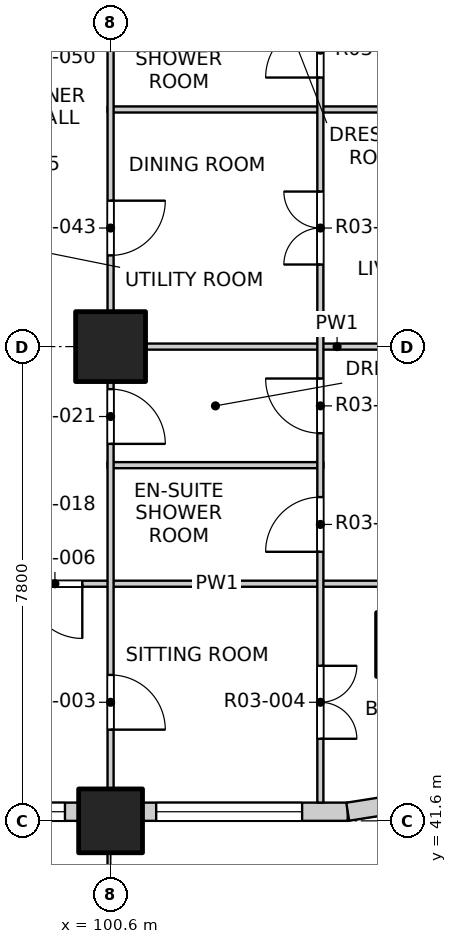
"""IFC4 building model, lengths in metres.
Left out: names, types, materials, properties, quantities, classifications, styles, units other than length and angle.
Written with IfcOpenShell. Run it as: python <this file> out.ifc"""

import sys

from ifc_helpers import new_model, si_unit, direction, frame, frame_2d, origin, origin_2d, place, context, subcontext, project, spatial, rectangle, extrude, element, fill, save


model = new_model("IFC4")
c1 = context("Model", 3, precision=1e-05, world=origin(), true_north=direction((0.0, 1.0)))
c2 = subcontext(c1, "Body", "Model", "MODEL_VIEW")
j1 = project(units=[si_unit("LENGTHUNIT", "METRE"), si_unit("PLANEANGLEUNIT", "RADIAN")], contexts=[c1])
p1 = place(None, origin())
s1 = spatial("IfcSite", under=j1, at=p1, CompositionType="ELEMENT")
p2 = place(p1, origin())
s2 = spatial("IfcBuilding", under=s1, at=p2, CompositionType="ELEMENT")
p3 = place(p2, frame((0.0, 0.0, 39.9)))
s3 = spatial("IfcBuildingStorey", under=s2, at=p3, CompositionType="ELEMENT", Elevation=39.9)
for number, where, z_axis, x_axis in (
    (1, (105.5, 44.5, -0.25), (0.0, 0.0, 1.0), (1.0, 0.0, 0.0)),
    (2, (100.6, 41.6, -0.25), (0.0, 0.0, 1.0), (1.0, 0.0, 0.0)),
):
    element("IfcColumn", number, at=place(p3, frame(where, z_axis=z_axis, x_axis=x_axis)), inside=s3, PredefinedType="COLUMN", context=c2, shape_type="SweptSolid", body=[
        extrude(rectangle(XDim=1.05, YDim=1.05, at=origin_2d()), origin(), (0.0, 0.0, 1.0), 3.4),
    ])
p4 = place(p3, frame((100.6, 49.4, -0.25), z_axis=(0.0, 0.0, 1.0), x_axis=(1.0, 0.0, 0.0)))
e3 = element("IfcColumn", 3, at=p4, inside=s3, PredefinedType="COLUMN", context=c2, shape_type="SweptSolid", body=[
    extrude(rectangle(XDim=1.15, YDim=1.15, at=origin_2d()), origin(), (0.0, 0.0, 1.0), 3.4),
])
p5 = place(p3, frame((93.325, 41.75, 0.0), z_axis=(0.0, 0.0, 1.0), x_axis=(1.0, 0.0, 0.0)))
e4 = element("IfcWall", 4, at=p5, inside=s3, PredefinedType="SOLIDWALL", context=c2, shape_type="SweptSolid", body=[
    extrude(rectangle(XDim=6.75, YDim=0.3, at=frame_2d((3.375, 0.0))), origin(), (0.0, 0.0, 1.0), 2.7),
])
p6 = place(p5, frame((0.525, 0.0, 0.0)))
e5 = element("IfcOpeningElement", 5, at=p6, cuts=e4, PredefinedType="OPENING", context=c2, shape_type="SweptSolid", body=[
    extrude(rectangle(XDim=1.8, YDim=2.4, at=frame_2d((0.9, 1.2))), frame((0.0, 0.16, 0.0), z_axis=(0.0, -1.0, 0.0), x_axis=(1.0, 0.0, 0.0)), (0.0, 0.0, 1.0), 0.32),
])
p7 = place(p5, frame((4.125, 0.0, 0.9)))
e6 = element("IfcOpeningElement", 6, at=p7, cuts=e4, PredefinedType="OPENING", context=c2, shape_type="SweptSolid", body=[
    extrude(rectangle(XDim=2.4, YDim=1.8, at=frame_2d((1.2, 0.9))), frame((0.0, 0.16, 0.0), z_axis=(0.0, -1.0, 0.0), x_axis=(1.0, 0.0, 0.0)), (0.0, 0.0, 1.0), 0.32),
])
p8 = place(p3, frame((101.125, 41.75, 0.0), z_axis=(0.0, 0.0, 1.0), x_axis=(1.0, 0.0, 0.0)))
e7 = element("IfcWall", 7, at=p8, inside=s3, PredefinedType="SOLIDWALL", context=c2, shape_type="SweptSolid", body=[
    extrude(rectangle(XDim=3.375, YDim=0.3, at=frame_2d((1.688, 0.0))), origin(), (0.0, 0.0, 1.0), 2.7),
])
p9 = place(p8, frame((0.225, 0.0, 0.9)))
e8 = element("IfcOpeningElement", 8, at=p9, cuts=e7, PredefinedType="OPENING", context=c2, shape_type="SweptSolid", body=[
    extrude(rectangle(XDim=2.4, YDim=1.8, at=frame_2d((1.2, 0.9))), frame((0.0, 0.16, 0.0), z_axis=(0.0, -1.0, 0.0), x_axis=(1.0, 0.0, 0.0)), (0.0, 0.0, 1.0), 0.32),
])
p10 = place(p3, frame((104.5, 41.75, 0.0), z_axis=(0.0, 0.0, 1.0), x_axis=(0.987678452879, 0.156496880861, 0.0)))
e9 = element("IfcWall", 9, at=p10, inside=s3, PredefinedType="SOLIDWALL", context=c2, shape_type="SweptSolid", body=[
    extrude(rectangle(XDim=1.173, YDim=0.3, at=frame_2d((0.586, 0.0))), origin(), (0.0, 0.0, 1.0), 2.7),
])
p11 = place(p3, frame((96.6, 45.5, 0.0), z_axis=(0.0, 0.0, 1.0), x_axis=(1.0, 0.0, 0.0)))
e10 = element("IfcWall", 10, at=p11, inside=s3, PredefinedType="PARTITIONING", context=c2, shape_type="SweptSolid", body=[
    extrude(rectangle(XDim=11.5, YDim=0.1, at=frame_2d((5.75, 0.0))), origin(), (0.0, 0.0, 1.0), 3.15),
])
p12 = place(p11, frame((2.635, 0.0, 0.0)))
e11 = element("IfcOpeningElement", 11, at=p12, cuts=e10, PredefinedType="OPENING", context=c2, shape_type="SweptSolid", body=[
    extrude(rectangle(XDim=0.9, YDim=2.1, at=frame_2d((0.45, 1.05))), frame((0.0, 0.06, 0.0), z_axis=(0.0, -1.0, 0.0), x_axis=(1.0, 0.0, 0.0)), (0.0, 0.0, 1.0), 0.12),
])
p13 = place(p3, frame((100.55, 47.45, 0.0), z_axis=(0.0, 0.0, 1.0), x_axis=(1.0, 0.0, 0.0)))
e12 = element("IfcWall", 12, at=p13, inside=s3, PredefinedType="PARTITIONING", context=c2, shape_type="SweptSolid", body=[
    extrude(rectangle(XDim=3.55, YDim=0.1, at=frame_2d((1.775, 0.0))), origin(), (0.0, 0.0, 1.0), 3.15),
])
for number, where, z_axis, x_axis in (
    (13, (100.55, 49.4, 0.0), (0.0, 0.0, 1.0), (1.0, 0.0, 0.0)),
    (14, (100.55, 53.3, 0.0), (0.0, 0.0, 1.0), (1.0, 0.0, 0.0)),
):
    element("IfcWall", number, at=place(p3, frame(where, z_axis=z_axis, x_axis=x_axis)), inside=s3, PredefinedType="PARTITIONING", context=c2, shape_type="SweptSolid", body=[
        extrude(rectangle(XDim=7.55, YDim=0.1, at=frame_2d((3.775, 0.0))), origin(), (0.0, 0.0, 1.0), 3.15),
    ])
p14 = place(p3, frame((100.6, 41.9, 0.0), z_axis=(0.0, 0.0, 1.0), x_axis=(0.0, 1.0, 0.0)))
e15 = element("IfcWall", 15, at=p14, inside=s3, PredefinedType="PARTITIONING", context=c2, shape_type="SweptSolid", body=[
    extrude(rectangle(XDim=7.5, YDim=0.1, at=frame_2d((3.75, 0.0))), origin(), (0.0, 0.0, 1.0), 2.55),
])
p15 = place(p14, frame((1.2, 0.0, 0.0)))
e16 = element("IfcOpeningElement", 16, at=p15, cuts=e15, PredefinedType="OPENING", context=c2, shape_type="SweptSolid", body=[
    extrude(rectangle(XDim=0.9, YDim=2.1, at=frame_2d((0.45, 1.05))), frame((0.0, 0.06, 0.0), z_axis=(0.0, -1.0, 0.0), x_axis=(1.0, 0.0, 0.0)), (0.0, 0.0, 1.0), 0.12),
])
p16 = place(p14, frame((5.9, 0.0, 0.0)))
e17 = element("IfcOpeningElement", 17, at=p16, cuts=e15, PredefinedType="OPENING", context=c2, shape_type="SweptSolid", body=[
    extrude(rectangle(XDim=0.9, YDim=2.1, at=frame_2d((0.45, 1.05))), frame((0.0, 0.06, 0.0), z_axis=(0.0, -1.0, 0.0), x_axis=(1.0, 0.0, 0.0)), (0.0, 0.0, 1.0), 0.12),
])
p17 = place(p3, frame((100.6, 49.4, 0.0), z_axis=(0.0, 0.0, 1.0), x_axis=(0.0, 1.0, 0.0)))
e18 = element("IfcWall", 18, at=p17, inside=s3, PredefinedType="PARTITIONING", context=c2, shape_type="SweptSolid", body=[
    extrude(rectangle(XDim=31.2, YDim=0.1, at=frame_2d((15.6, 0.0))), origin(), (0.0, 0.0, 1.0), 3.15),
])
p18 = place(p17, frame((1.5, 0.0, 0.0)))
e19 = element("IfcOpeningElement", 19, at=p18, cuts=e18, PredefinedType="OPENING", context=c2, shape_type="SweptSolid", body=[
    extrude(rectangle(XDim=0.9, YDim=2.1, at=frame_2d((0.45, 1.05))), frame((0.0, 0.06, 0.0), z_axis=(0.0, -1.0, 0.0), x_axis=(1.0, 0.0, 0.0)), (0.0, 0.0, 1.0), 0.12),
])
p19 = place(p17, frame((6.225, 0.0, 0.0)))
e20 = element("IfcOpeningElement", 20, at=p19, cuts=e18, PredefinedType="OPENING", context=c2, shape_type="SweptSolid", body=[
    extrude(rectangle(XDim=0.9, YDim=2.1, at=frame_2d((0.45, 1.05))), frame((0.0, 0.06, 0.0), z_axis=(0.0, -1.0, 0.0), x_axis=(1.0, 0.0, 0.0)), (0.0, 0.0, 1.0), 0.12),
])
p20 = place(p17, frame((10.275, 0.0, 0.0)))
e21 = element("IfcOpeningElement", 21, at=p20, cuts=e18, PredefinedType="OPENING", context=c2, shape_type="SweptSolid", body=[
    extrude(rectangle(XDim=0.9, YDim=2.1, at=frame_2d((0.45, 1.05))), frame((0.0, 0.06, 0.0), z_axis=(0.0, -1.0, 0.0), x_axis=(1.0, 0.0, 0.0)), (0.0, 0.0, 1.0), 0.12),
])
p21 = place(p17, frame((14.0, 0.0, 0.0)))
e22 = element("IfcOpeningElement", 22, at=p21, cuts=e18, PredefinedType="OPENING", context=c2, shape_type="SweptSolid", body=[
    extrude(rectangle(XDim=0.9, YDim=2.1, at=frame_2d((0.45, 1.05))), frame((0.0, 0.06, 0.0), z_axis=(0.0, -1.0, 0.0), x_axis=(1.0, 0.0, 0.0)), (0.0, 0.0, 1.0), 0.12),
])
p22 = place(p17, frame((17.1, 0.0, 0.0)))
e23 = element("IfcOpeningElement", 23, at=p22, cuts=e18, PredefinedType="OPENING", context=c2, shape_type="SweptSolid", body=[
    extrude(rectangle(XDim=0.9, YDim=2.1, at=frame_2d((0.45, 1.05))), frame((0.0, 0.06, 0.0), z_axis=(0.0, -1.0, 0.0), x_axis=(1.0, 0.0, 0.0)), (0.0, 0.0, 1.0), 0.12),
])
p23 = place(p17, frame((21.0, 0.0, 0.0)))
e24 = element("IfcOpeningElement", 24, at=p23, cuts=e18, PredefinedType="OPENING", context=c2, shape_type="SweptSolid", body=[
    extrude(rectangle(XDim=0.9, YDim=2.1, at=frame_2d((0.45, 1.05))), frame((0.0, 0.06, 0.0), z_axis=(0.0, -1.0, 0.0), x_axis=(1.0, 0.0, 0.0)), (0.0, 0.0, 1.0), 0.12),
])
p24 = place(p17, frame((25.875, 0.0, 0.0)))
e25 = element("IfcOpeningElement", 25, at=p24, cuts=e18, PredefinedType="OPENING", context=c2, shape_type="SweptSolid", body=[
    extrude(rectangle(XDim=0.9, YDim=2.1, at=frame_2d((0.45, 1.05))), frame((0.0, 0.06, 0.0), z_axis=(0.0, -1.0, 0.0), x_axis=(1.0, 0.0, 0.0)), (0.0, 0.0, 1.0), 0.12),
])
p25 = place(p17, frame((29.6, 0.0, 0.0)))
e26 = element("IfcOpeningElement", 26, at=p25, cuts=e18, PredefinedType="OPENING", context=c2, shape_type="SweptSolid", body=[
    extrude(rectangle(XDim=0.9, YDim=2.1, at=frame_2d((0.45, 1.05))), frame((0.0, 0.06, 0.0), z_axis=(0.0, -1.0, 0.0), x_axis=(1.0, 0.0, 0.0)), (0.0, 0.0, 1.0), 0.12),
])
p26 = place(p3, frame((104.05, 41.9, 0.0), z_axis=(0.0, 0.0, 1.0), x_axis=(0.0, 1.0, 0.0)))
e27 = element("IfcWall", 27, at=p26, inside=s3, PredefinedType="PARTITIONING", context=c2, shape_type="SweptSolid", body=[
    extrude(rectangle(XDim=46.2, YDim=0.1, at=frame_2d((23.1, 0.0))), origin(), (0.0, 0.0, 1.0), 3.15),
])
p27 = place(p26, frame((1.05, 0.0, 0.0)))
e28 = element("IfcOpeningElement", 28, at=p27, cuts=e27, PredefinedType="OPENING", context=c2, shape_type="SweptSolid", body=[
    extrude(rectangle(XDim=1.2, YDim=2.1, at=frame_2d((0.6, 1.05))), frame((0.0, 0.06, 0.0), z_axis=(0.0, -1.0, 0.0), x_axis=(1.0, 0.0, 0.0)), (0.0, 0.0, 1.0), 0.12),
])
p28 = place(p26, frame((4.125, 0.0, 0.0)))
e29 = element("IfcOpeningElement", 29, at=p28, cuts=e27, PredefinedType="OPENING", context=c2, shape_type="SweptSolid", body=[
    extrude(rectangle(XDim=0.9, YDim=2.1, at=frame_2d((0.45, 1.05))), frame((0.0, 0.06, 0.0), z_axis=(0.0, -1.0, 0.0), x_axis=(1.0, 0.0, 0.0)), (0.0, 0.0, 1.0), 0.12),
])
p29 = place(p26, frame((6.075, 0.0, 0.0)))
e30 = element("IfcOpeningElement", 30, at=p29, cuts=e27, PredefinedType="OPENING", context=c2, shape_type="SweptSolid", body=[
    extrude(rectangle(XDim=0.9, YDim=2.1, at=frame_2d((0.45, 1.05))), frame((0.0, 0.06, 0.0), z_axis=(0.0, -1.0, 0.0), x_axis=(1.0, 0.0, 0.0)), (0.0, 0.0, 1.0), 0.12),
])
p30 = place(p26, frame((8.85, 0.0, 0.0)))
e31 = element("IfcOpeningElement", 31, at=p30, cuts=e27, PredefinedType="OPENING", context=c2, shape_type="SweptSolid", body=[
    extrude(rectangle(XDim=1.2, YDim=2.1, at=frame_2d((0.6, 1.05))), frame((0.0, 0.06, 0.0), z_axis=(0.0, -1.0, 0.0), x_axis=(1.0, 0.0, 0.0)), (0.0, 0.0, 1.0), 0.12),
])
p31 = place(p26, frame((11.925, 0.0, 0.0)))
e32 = element("IfcOpeningElement", 32, at=p31, cuts=e27, PredefinedType="OPENING", context=c2, shape_type="SweptSolid", body=[
    extrude(rectangle(XDim=0.9, YDim=2.1, at=frame_2d((0.45, 1.05))), frame((0.0, 0.06, 0.0), z_axis=(0.0, -1.0, 0.0), x_axis=(1.0, 0.0, 0.0)), (0.0, 0.0, 1.0), 0.12),
])
p32 = place(p26, frame((13.875, 0.0, 0.0)))
e33 = element("IfcOpeningElement", 33, at=p32, cuts=e27, PredefinedType="OPENING", context=c2, shape_type="SweptSolid", body=[
    extrude(rectangle(XDim=0.9, YDim=2.1, at=frame_2d((0.45, 1.05))), frame((0.0, 0.06, 0.0), z_axis=(0.0, -1.0, 0.0), x_axis=(1.0, 0.0, 0.0)), (0.0, 0.0, 1.0), 0.12),
])
p33 = place(p26, frame((15.825, 0.0, 0.0)))
e34 = element("IfcOpeningElement", 34, at=p33, cuts=e27, PredefinedType="OPENING", context=c2, shape_type="SweptSolid", body=[
    extrude(rectangle(XDim=0.9, YDim=2.1, at=frame_2d((0.45, 1.05))), frame((0.0, 0.06, 0.0), z_axis=(0.0, -1.0, 0.0), x_axis=(1.0, 0.0, 0.0)), (0.0, 0.0, 1.0), 0.12),
])
p34 = place(p26, frame((17.775, 0.0, 0.0)))
e35 = element("IfcOpeningElement", 35, at=p34, cuts=e27, PredefinedType="OPENING", context=c2, shape_type="SweptSolid", body=[
    extrude(rectangle(XDim=0.9, YDim=2.1, at=frame_2d((0.45, 1.05))), frame((0.0, 0.06, 0.0), z_axis=(0.0, -1.0, 0.0), x_axis=(1.0, 0.0, 0.0)), (0.0, 0.0, 1.0), 0.12),
])
p35 = place(p26, frame((19.725, 0.0, 0.0)))
e36 = element("IfcOpeningElement", 36, at=p35, cuts=e27, PredefinedType="OPENING", context=c2, shape_type="SweptSolid", body=[
    extrude(rectangle(XDim=0.9, YDim=2.1, at=frame_2d((0.45, 1.05))), frame((0.0, 0.06, 0.0), z_axis=(0.0, -1.0, 0.0), x_axis=(1.0, 0.0, 0.0)), (0.0, 0.0, 1.0), 0.12),
])
p36 = place(p26, frame((21.675, 0.0, 0.0)))
e37 = element("IfcOpeningElement", 37, at=p36, cuts=e27, PredefinedType="OPENING", context=c2, shape_type="SweptSolid", body=[
    extrude(rectangle(XDim=0.9, YDim=2.1, at=frame_2d((0.45, 1.05))), frame((0.0, 0.06, 0.0), z_axis=(0.0, -1.0, 0.0), x_axis=(1.0, 0.0, 0.0)), (0.0, 0.0, 1.0), 0.12),
])
p37 = place(p26, frame((24.45, 0.0, 0.0)))
e38 = element("IfcOpeningElement", 38, at=p37, cuts=e27, PredefinedType="OPENING", context=c2, shape_type="SweptSolid", body=[
    extrude(rectangle(XDim=1.2, YDim=2.1, at=frame_2d((0.6, 1.05))), frame((0.0, 0.06, 0.0), z_axis=(0.0, -1.0, 0.0), x_axis=(1.0, 0.0, 0.0)), (0.0, 0.0, 1.0), 0.12),
])
p38 = place(p26, frame((28.35, 0.0, 0.0)))
e39 = element("IfcOpeningElement", 39, at=p38, cuts=e27, PredefinedType="OPENING", context=c2, shape_type="SweptSolid", body=[
    extrude(rectangle(XDim=1.2, YDim=2.1, at=frame_2d((0.6, 1.05))), frame((0.0, 0.06, 0.0), z_axis=(0.0, -1.0, 0.0), x_axis=(1.0, 0.0, 0.0)), (0.0, 0.0, 1.0), 0.12),
])
p39 = place(p26, frame((31.425, 0.0, 0.0)))
e40 = element("IfcOpeningElement", 40, at=p39, cuts=e27, PredefinedType="OPENING", context=c2, shape_type="SweptSolid", body=[
    extrude(rectangle(XDim=0.9, YDim=2.1, at=frame_2d((0.45, 1.05))), frame((0.0, 0.06, 0.0), z_axis=(0.0, -1.0, 0.0), x_axis=(1.0, 0.0, 0.0)), (0.0, 0.0, 1.0), 0.12),
])
p40 = place(p26, frame((33.375, 0.0, 0.0)))
e41 = element("IfcOpeningElement", 41, at=p40, cuts=e27, PredefinedType="OPENING", context=c2, shape_type="SweptSolid", body=[
    extrude(rectangle(XDim=0.9, YDim=2.1, at=frame_2d((0.45, 1.05))), frame((0.0, 0.06, 0.0), z_axis=(0.0, -1.0, 0.0), x_axis=(1.0, 0.0, 0.0)), (0.0, 0.0, 1.0), 0.12),
])
p41 = place(p26, frame((35.325, 0.0, 0.0)))
e42 = element("IfcOpeningElement", 42, at=p41, cuts=e27, PredefinedType="OPENING", context=c2, shape_type="SweptSolid", body=[
    extrude(rectangle(XDim=0.9, YDim=2.1, at=frame_2d((0.45, 1.05))), frame((0.0, 0.06, 0.0), z_axis=(0.0, -1.0, 0.0), x_axis=(1.0, 0.0, 0.0)), (0.0, 0.0, 1.0), 0.12),
])
p42 = place(p26, frame((37.275, 0.0, 0.0)))
e43 = element("IfcOpeningElement", 43, at=p42, cuts=e27, PredefinedType="OPENING", context=c2, shape_type="SweptSolid", body=[
    extrude(rectangle(XDim=0.9, YDim=2.1, at=frame_2d((0.45, 1.05))), frame((0.0, 0.06, 0.0), z_axis=(0.0, -1.0, 0.0), x_axis=(1.0, 0.0, 0.0)), (0.0, 0.0, 1.0), 0.12),
])
p43 = place(p26, frame((40.05, 0.0, 0.0)))
e44 = element("IfcOpeningElement", 44, at=p43, cuts=e27, PredefinedType="OPENING", context=c2, shape_type="SweptSolid", body=[
    extrude(rectangle(XDim=1.2, YDim=2.1, at=frame_2d((0.6, 1.05))), frame((0.0, 0.06, 0.0), z_axis=(0.0, -1.0, 0.0), x_axis=(1.0, 0.0, 0.0)), (0.0, 0.0, 1.0), 0.12),
])
p44 = place(p26, frame((43.95, 0.0, 0.0)))
e45 = element("IfcOpeningElement", 45, at=p44, cuts=e27, PredefinedType="OPENING", context=c2, shape_type="SweptSolid", body=[
    extrude(rectangle(XDim=1.2, YDim=2.1, at=frame_2d((0.6, 1.05))), frame((0.0, 0.06, 0.0), z_axis=(0.0, -1.0, 0.0), x_axis=(1.0, 0.0, 0.0)), (0.0, 0.0, 1.0), 0.12),
])
p45 = place(p7, origin())
e46 = element("IfcWindow", 46, at=p45, inside=s3, PartitioningType="DOUBLE_PANEL_VERTICAL", PredefinedType="WINDOW", context=c2, shape_type="SweptSolid", body=[
    extrude(rectangle(XDim=2.4, YDim=1.8, at=frame_2d((1.2, 0.9))), frame((0.0, 0.03, 0.0), z_axis=(0.0, -1.0, 0.0), x_axis=(1.0, 0.0, 0.0)), (0.0, 0.0, 1.0), 0.06),
])
fill(e6, e46)
p46 = place(p9, origin())
e47 = element("IfcWindow", 47, at=p46, inside=s3, PartitioningType="DOUBLE_PANEL_VERTICAL", PredefinedType="WINDOW", context=c2, shape_type="SweptSolid", body=[
    extrude(rectangle(XDim=2.4, YDim=1.8, at=frame_2d((1.2, 0.9))), frame((0.0, 0.03, 0.0), z_axis=(0.0, -1.0, 0.0), x_axis=(1.0, 0.0, 0.0)), (0.0, 0.0, 1.0), 0.06),
])
fill(e8, e47)
p47 = place(p15, origin())
e48 = element("IfcDoor", 48, at=p47, inside=s3, OperationType="SINGLE_SWING_RIGHT", PredefinedType="DOOR", context=c2, shape_type="SweptSolid", body=[
    extrude(rectangle(XDim=0.9, YDim=2.1, at=frame_2d((0.45, 1.05))), frame((0.0, 0.025, 0.0), z_axis=(0.0, -1.0, 0.0), x_axis=(1.0, 0.0, 0.0)), (0.0, 0.0, 1.0), 0.05),
])
fill(e16, e48)
p48 = place(p27, origin())
e49 = element("IfcDoor", 49, at=p48, inside=s3, OperationType="DOUBLE_DOOR_SINGLE_SWING", PredefinedType="DOOR", context=c2, shape_type="SweptSolid", body=[
    extrude(rectangle(XDim=1.2, YDim=2.1, at=frame_2d((0.6, 1.05))), frame((0.0, 0.025, 0.0), z_axis=(0.0, -1.0, 0.0), x_axis=(1.0, 0.0, 0.0)), (0.0, 0.0, 1.0), 0.05),
])
fill(e28, e49)
p49 = place(p12, origin())
e50 = element("IfcDoor", 50, at=p49, inside=s3, OperationType="SINGLE_SWING_LEFT", PredefinedType="DOOR", context=c2, shape_type="SweptSolid", body=[
    extrude(rectangle(XDim=0.9, YDim=2.1, at=frame_2d((0.45, 1.05))), frame((0.0, 0.025, 0.0), z_axis=(0.0, -1.0, 0.0), x_axis=(1.0, 0.0, 0.0)), (0.0, 0.0, 1.0), 0.05),
])
fill(e11, e50)
p50 = place(p28, origin())
e51 = element("IfcDoor", 51, at=p50, inside=s3, OperationType="SINGLE_SWING_LEFT", PredefinedType="DOOR", context=c2, shape_type="SweptSolid", body=[
    extrude(rectangle(XDim=0.9, YDim=2.1, at=frame_2d((0.45, 1.05))), frame((0.0, 0.025, 0.0), z_axis=(0.0, -1.0, 0.0), x_axis=(1.0, 0.0, 0.0)), (0.0, 0.0, 1.0), 0.05),
])
fill(e29, e51)
p51 = place(p16, origin())
e52 = element("IfcDoor", 52, at=p51, inside=s3, OperationType="SINGLE_SWING_RIGHT", PredefinedType="DOOR", context=c2, shape_type="SweptSolid", body=[
    extrude(rectangle(XDim=0.9, YDim=2.1, at=frame_2d((0.45, 1.05))), frame((0.0, 0.025, 0.0), z_axis=(0.0, -1.0, 0.0), x_axis=(1.0, 0.0, 0.0)), (0.0, 0.0, 1.0), 0.05),
])
fill(e17, e52)
p52 = place(p29, origin())
e53 = element("IfcDoor", 53, at=p52, inside=s3, OperationType="SINGLE_SWING_RIGHT", PredefinedType="DOOR", context=c2, shape_type="SweptSolid", body=[
    extrude(rectangle(XDim=0.9, YDim=2.1, at=frame_2d((0.45, 1.05))), frame((0.0, 0.025, 0.0), z_axis=(0.0, -1.0, 0.0), x_axis=(1.0, 0.0, 0.0)), (0.0, 0.0, 1.0), 0.05),
])
fill(e30, e53)
p53 = place(p18, origin())
e54 = element("IfcDoor", 54, at=p53, inside=s3, OperationType="SINGLE_SWING_LEFT", PredefinedType="DOOR", context=c2, shape_type="SweptSolid", body=[
    extrude(rectangle(XDim=0.9, YDim=2.1, at=frame_2d((0.45, 1.05))), frame((0.0, 0.025, 0.0), z_axis=(0.0, -1.0, 0.0), x_axis=(1.0, 0.0, 0.0)), (0.0, 0.0, 1.0), 0.05),
])
fill(e19, e54)
p54 = place(p30, origin())
e55 = element("IfcDoor", 55, at=p54, inside=s3, OperationType="DOUBLE_DOOR_SINGLE_SWING", PredefinedType="DOOR", context=c2, shape_type="SweptSolid", body=[
    extrude(rectangle(XDim=1.2, YDim=2.1, at=frame_2d((0.6, 1.05))), frame((0.0, 0.025, 0.0), z_axis=(0.0, -1.0, 0.0), x_axis=(1.0, 0.0, 0.0)), (0.0, 0.0, 1.0), 0.05),
])
fill(e31, e55)
p55 = place(p31, origin())
e56 = element("IfcDoor", 56, at=p55, inside=s3, OperationType="SINGLE_SWING_LEFT", PredefinedType="DOOR", context=c2, shape_type="SweptSolid", body=[
    extrude(rectangle(XDim=0.9, YDim=2.1, at=frame_2d((0.45, 1.05))), frame((0.0, 0.025, 0.0), z_axis=(0.0, -1.0, 0.0), x_axis=(1.0, 0.0, 0.0)), (0.0, 0.0, 1.0), 0.05),
])
fill(e32, e56)
save(model, sys.argv[1])
